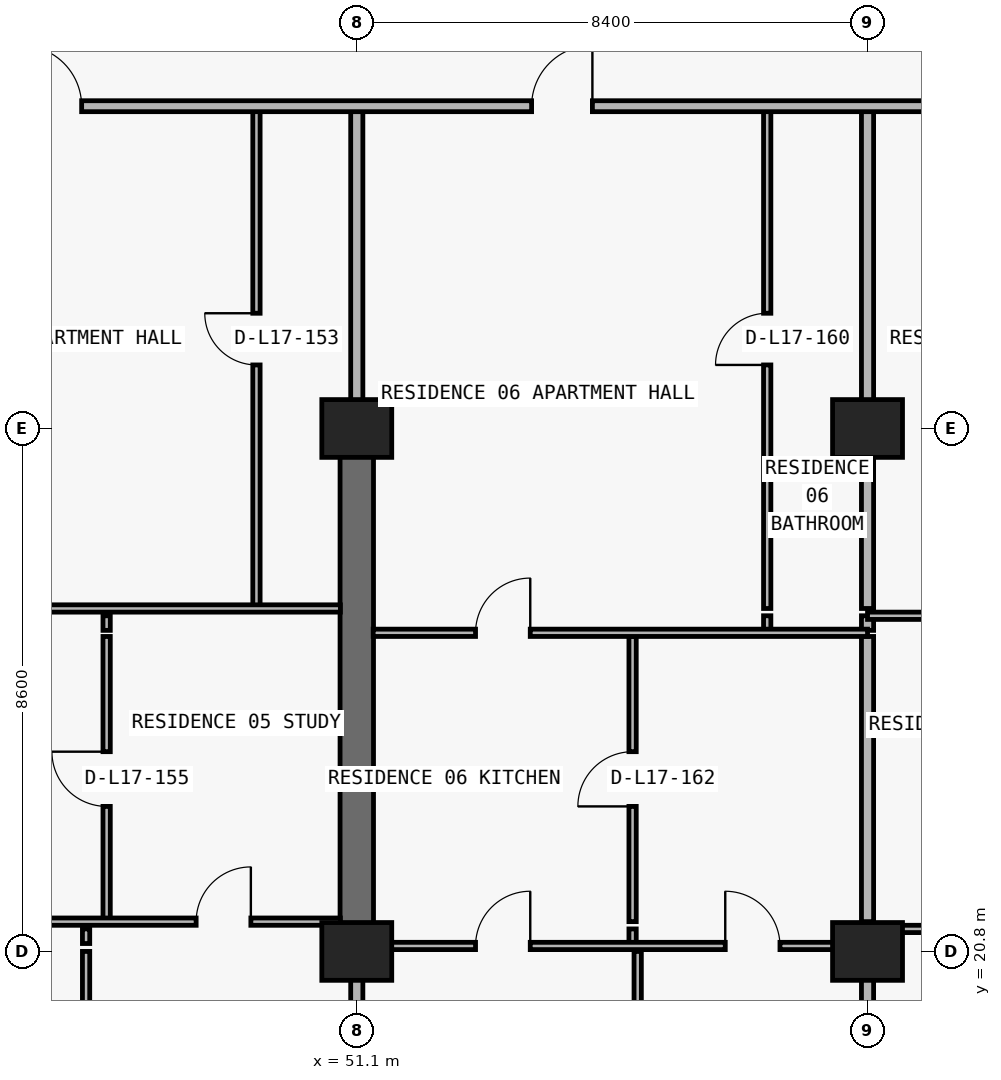
"""IFC4 building model, lengths in metres.
Left out: names, types, materials, properties, quantities, classifications, styles, units other than length and angle.
Written with IfcOpenShell. Run it as: python <this file> out.ifc"""

import sys

from ifc_helpers import new_model, si_unit, direction, frame, frame_2d, origin, origin_2d, place, context, subcontext, project, spatial, rectangle, extrude, element, fill, save


model = new_model("IFC4")
c1 = context("Model", 3, precision=1e-05, world=origin(), true_north=direction((0.0, 1.0)))
c2 = subcontext(c1, "Body", "Model", "MODEL_VIEW")
j1 = project(units=[si_unit("LENGTHUNIT", "METRE"), si_unit("PLANEANGLEUNIT", "RADIAN")], contexts=[c1])
p1 = place(None, origin())
s1 = spatial("IfcSite", under=j1, at=p1, CompositionType="ELEMENT")
p2 = place(p1, origin())
s2 = spatial("IfcBuilding", under=s1, at=p2, CompositionType="ELEMENT")
p3 = place(p2, frame((0.0, 0.0, 66.3)))
s3 = spatial("IfcBuildingStorey", under=s2, at=p3, CompositionType="ELEMENT", Elevation=66.3)
for number, where, z_axis, x_axis in (
    (1, (51.1, 20.8, 0.0), (0.0, 0.0, 1.0), (1.0, 0.0, 0.0)),
    (2, (59.5, 20.8, 0.0), (0.0, 0.0, 1.0), (1.0, 0.0, 0.0)),
    (3, (51.1, 29.4, 0.0), (0.0, 0.0, 1.0), (1.0, 0.0, 0.0)),
    (4, (59.5, 29.4, 0.0), (0.0, 0.0, 1.0), (1.0, 0.0, 0.0)),
):
    element("IfcColumn", number, at=place(p3, frame(where, z_axis=z_axis, x_axis=x_axis)), inside=s3, PredefinedType="COLUMN", context=c2, shape_type="SweptSolid", body=[
        extrude(rectangle(XDim=1.15, YDim=0.95, at=origin_2d()), origin(), (0.0, 0.0, 1.0), 3.05),
    ])
p4 = place(p3, frame((51.1, 20.8, 0.0), z_axis=(0.0, 0.0, 1.0), x_axis=(0.0, 1.0, 0.0)))
e5 = element("IfcWall", 5, at=p4, inside=s3, PredefinedType="SHEAR", context=c2, shape_type="SweptSolid", body=[
    extrude(rectangle(XDim=8.6, YDim=0.55, at=frame_2d((4.3, 0.0))), origin(), (0.0, 0.0, 1.0), 3.05),
])
p5 = place(p3, frame((46.648, 6.24, 0.0), z_axis=(0.0, 0.0, 1.0), x_axis=(0.0, 1.0, 0.0)))
e6 = element("IfcWall", 6, at=p5, inside=s3, PredefinedType="PARTITIONING", context=c2, shape_type="SweptSolid", body=[
    extrude(rectangle(XDim=14.56, YDim=0.12, at=frame_2d((7.28, 0.0))), origin(), (0.0, 0.0, 1.0), 2.423),
])
p6 = place(p3, frame((46.648, 20.93, 0.0), z_axis=(0.0, 0.0, 1.0), x_axis=(0.0, 1.0, 0.0)))
e7 = element("IfcWall", 7, at=p6, inside=s3, PredefinedType="PARTITIONING", context=c2, shape_type="SweptSolid", body=[
    extrude(rectangle(XDim=0.24, YDim=0.12, at=frame_2d((0.12, 0.0))), origin(), (0.0, 0.0, 1.0), 2.423),
])
p7 = place(p3, frame((46.986, 21.29, 0.0), z_axis=(0.0, 0.0, 1.0), x_axis=(0.0, 1.0, 0.0)))
e8 = element("IfcWall", 8, at=p7, inside=s3, PredefinedType="PARTITIONING", context=c2, shape_type="SweptSolid", body=[
    extrude(rectangle(XDim=4.69, YDim=0.12, at=frame_2d((2.345, 0.0))), origin(), (0.0, 0.0, 1.0), 2.423),
])
p8 = place(p7, frame((1.895, 0.0, 0.0)))
e9 = element("IfcOpeningElement", 9, at=p8, cuts=e8, PredefinedType="OPENING", context=c2, shape_type="SweptSolid", body=[
    extrude(rectangle(XDim=0.9, YDim=2.15, at=frame_2d((0.45, 1.075))), frame((0.0, 0.07, 0.0), z_axis=(0.0, -1.0, 0.0), x_axis=(1.0, 0.0, 0.0)), (0.0, 0.0, 1.0), 0.14),
])
p9 = place(p3, frame((46.986, 26.08, 0.0), z_axis=(0.0, 0.0, 1.0), x_axis=(0.0, 1.0, 0.0)))
e10 = element("IfcWall", 10, at=p9, inside=s3, PredefinedType="PARTITIONING", context=c2, shape_type="SweptSolid", body=[
    extrude(rectangle(XDim=0.24, YDim=0.12, at=frame_2d((0.12, 0.0))), origin(), (0.0, 0.0, 1.0), 2.423),
])
p10 = place(p3, frame((49.45, 26.44, 0.0), z_axis=(0.0, 0.0, 1.0), x_axis=(0.0, 1.0, 0.0)))
e11 = element("IfcWall", 11, at=p10, inside=s3, PredefinedType="PARTITIONING", context=c2, shape_type="SweptSolid", body=[
    extrude(rectangle(XDim=8.26, YDim=0.12, at=frame_2d((4.13, 0.0))), origin(), (0.0, 0.0, 1.0), 3.05),
])
p11 = place(p10, frame((4.005, 0.0, 0.0)))
e12 = element("IfcOpeningElement", 12, at=p11, cuts=e11, PredefinedType="OPENING", context=c2, shape_type="SweptSolid", body=[
    extrude(rectangle(XDim=0.85, YDim=2.1, at=frame_2d((0.425, 1.05))), frame((0.0, 0.07, 0.0), z_axis=(0.0, -1.0, 0.0), x_axis=(1.0, 0.0, 0.0)), (0.0, 0.0, 1.0), 0.14),
])
p12 = place(p3, frame((51.1, 6.24, 0.0), z_axis=(0.0, 0.0, 1.0), x_axis=(0.0, 1.0, 0.0)))
e13 = element("IfcWall", 13, at=p12, inside=s3, PredefinedType="PARTITIONING", context=c2, shape_type="SweptSolid", body=[
    extrude(rectangle(XDim=14.555, YDim=0.2, at=frame_2d((7.277, 0.0))), origin(), (0.0, 0.0, 1.0), 2.11),
])
p13 = place(p3, frame((51.1, 29.405, 0.0), z_axis=(0.0, 0.0, 1.0), x_axis=(0.0, 1.0, 0.0)))
e14 = element("IfcWall", 14, at=p13, inside=s3, PredefinedType="PARTITIONING", context=c2, shape_type="SweptSolid", body=[
    extrude(rectangle(XDim=5.295, YDim=0.2, at=frame_2d((2.647, 0.0))), origin(), (0.0, 0.0, 1.0), 2.335),
])
p14 = place(p3, frame((55.636, 20.93, 0.0), z_axis=(0.0, 0.0, 1.0), x_axis=(0.0, 1.0, 0.0)))
e15 = element("IfcWall", 15, at=p14, inside=s3, PredefinedType="PARTITIONING", context=c2, shape_type="SweptSolid", body=[
    extrude(rectangle(XDim=0.24, YDim=0.12, at=frame_2d((0.12, 0.0))), origin(), (0.0, 0.0, 1.0), 3.05),
])
p15 = place(p3, frame((55.636, 21.29, 0.0), z_axis=(0.0, 0.0, 1.0), x_axis=(0.0, 1.0, 0.0)))
e16 = element("IfcWall", 16, at=p15, inside=s3, PredefinedType="PARTITIONING", context=c2, shape_type="SweptSolid", body=[
    extrude(rectangle(XDim=4.69, YDim=0.12, at=frame_2d((2.345, 0.0))), origin(), (0.0, 0.0, 1.0), 3.05),
])
p16 = place(p15, frame((1.895, 0.0, 0.0)))
e17 = element("IfcOpeningElement", 17, at=p16, cuts=e16, PredefinedType="OPENING", context=c2, shape_type="SweptSolid", body=[
    extrude(rectangle(XDim=0.9, YDim=2.15, at=frame_2d((0.45, 1.075))), frame((0.0, 0.07, 0.0), z_axis=(0.0, -1.0, 0.0), x_axis=(1.0, 0.0, 0.0)), (0.0, 0.0, 1.0), 0.14),
])
p17 = place(p3, frame((55.72, 6.24, 0.0), z_axis=(0.0, 0.0, 1.0), x_axis=(0.0, 1.0, 0.0)))
e18 = element("IfcWall", 18, at=p17, inside=s3, PredefinedType="PARTITIONING", context=c2, shape_type="SweptSolid", body=[
    extrude(rectangle(XDim=14.56, YDim=0.12, at=frame_2d((7.28, 0.0))), origin(), (0.0, 0.0, 1.0), 3.05),
])
p18 = place(p3, frame((57.85, 26.08, 0.0), z_axis=(0.0, 0.0, 1.0), x_axis=(0.0, 1.0, 0.0)))
e19 = element("IfcWall", 19, at=p18, inside=s3, PredefinedType="PARTITIONING", context=c2, shape_type="SweptSolid", body=[
    extrude(rectangle(XDim=0.24, YDim=0.12, at=frame_2d((0.12, 0.0))), origin(), (0.0, 0.0, 1.0), 3.05),
])
p19 = place(p3, frame((57.85, 26.44, 0.0), z_axis=(0.0, 0.0, 1.0), x_axis=(0.0, 1.0, 0.0)))
e20 = element("IfcWall", 20, at=p19, inside=s3, PredefinedType="PARTITIONING", context=c2, shape_type="SweptSolid", body=[
    extrude(rectangle(XDim=8.26, YDim=0.12, at=frame_2d((4.13, 0.0))), origin(), (0.0, 0.0, 1.0), 3.05),
])
p20 = place(p19, frame((4.005, 0.0, 0.0)))
e21 = element("IfcOpeningElement", 21, at=p20, cuts=e20, PredefinedType="OPENING", context=c2, shape_type="SweptSolid", body=[
    extrude(rectangle(XDim=0.85, YDim=2.1, at=frame_2d((0.425, 1.05))), frame((0.0, 0.07, 0.0), z_axis=(0.0, -1.0, 0.0), x_axis=(1.0, 0.0, 0.0)), (0.0, 0.0, 1.0), 0.14),
])
p21 = place(p3, frame((59.5, 6.24, 0.0), z_axis=(0.0, 0.0, 1.0), x_axis=(0.0, 1.0, 0.0)))
e22 = element("IfcWall", 22, at=p21, inside=s3, PredefinedType="PARTITIONING", context=c2, shape_type="SweptSolid", body=[
    extrude(rectangle(XDim=14.56, YDim=0.2, at=frame_2d((7.28, 0.0))), origin(), (0.0, 0.0, 1.0), 2.11),
])
p22 = place(p3, frame((59.5, 20.93, 0.0), z_axis=(0.0, 0.0, 1.0), x_axis=(0.0, 1.0, 0.0)))
e23 = element("IfcWall", 23, at=p22, inside=s3, PredefinedType="PARTITIONING", context=c2, shape_type="SweptSolid", body=[
    extrude(rectangle(XDim=0.24, YDim=0.2, at=frame_2d((0.12, 0.0))), origin(), (0.0, 0.0, 1.0), 3.05),
])
p23 = place(p3, frame((59.5, 21.29, 0.0), z_axis=(0.0, 0.0, 1.0), x_axis=(0.0, 1.0, 0.0)))
e24 = element("IfcWall", 24, at=p23, inside=s3, PredefinedType="PARTITIONING", context=c2, shape_type="SweptSolid", body=[
    extrude(rectangle(XDim=4.69, YDim=0.2, at=frame_2d((2.345, 0.0))), origin(), (0.0, 0.0, 1.0), 2.11),
])
p24 = place(p3, frame((59.5, 26.08, 0.0), z_axis=(0.0, 0.0, 1.0), x_axis=(0.0, 1.0, 0.0)))
e25 = element("IfcWall", 25, at=p24, inside=s3, PredefinedType="PARTITIONING", context=c2, shape_type="SweptSolid", body=[
    extrude(rectangle(XDim=0.24, YDim=0.2, at=frame_2d((0.12, 0.0))), origin(), (0.0, 0.0, 1.0), 2.11),
])
p25 = place(p3, frame((59.5, 26.44, 0.0), z_axis=(0.0, 0.0, 1.0), x_axis=(0.0, 1.0, 0.0)))
e26 = element("IfcWall", 26, at=p25, inside=s3, PredefinedType="PARTITIONING", context=c2, shape_type="SweptSolid", body=[
    extrude(rectangle(XDim=8.26, YDim=0.2, at=frame_2d((4.13, 0.0))), origin(), (0.0, 0.0, 1.0), 2.11),
])
p26 = place(p3, frame((51.37, 20.89, 0.0), z_axis=(0.0, 0.0, 1.0), x_axis=(1.0, 0.0, 0.0)))
e27 = element("IfcWall", 27, at=p26, inside=s3, PredefinedType="PARTITIONING", context=c2, shape_type="SweptSolid", body=[
    extrude(rectangle(XDim=8.13, YDim=0.12, at=frame_2d((4.065, 0.0))), origin(), (0.0, 0.0, 1.0), 2.11),
])
p27 = place(p26, frame((1.683, 0.0, 0.0)))
e28 = element("IfcOpeningElement", 28, at=p27, cuts=e27, PredefinedType="OPENING", context=c2, shape_type="SweptSolid", body=[
    extrude(rectangle(XDim=0.9, YDim=2.06, at=frame_2d((0.45, 1.03))), frame((0.0, 0.07, 0.0), z_axis=(0.0, -1.0, 0.0), x_axis=(1.0, 0.0, 0.0)), (0.0, 0.0, 1.0), 0.14),
])
p28 = place(p26, frame((5.79, 0.0, 0.0)))
e29 = element("IfcOpeningElement", 29, at=p28, cuts=e27, PredefinedType="OPENING", context=c2, shape_type="SweptSolid", body=[
    extrude(rectangle(XDim=0.9, YDim=2.06, at=frame_2d((0.45, 1.03))), frame((0.0, 0.07, 0.0), z_axis=(0.0, -1.0, 0.0), x_axis=(1.0, 0.0, 0.0)), (0.0, 0.0, 1.0), 0.14),
])
p29 = place(p3, frame((59.5, 21.17, 0.0), z_axis=(0.0, 0.0, 1.0), x_axis=(1.0, 0.0, 0.0)))
e30 = element("IfcWall", 30, at=p29, inside=s3, PredefinedType="PARTITIONING", context=c2, shape_type="SweptSolid", body=[
    extrude(rectangle(XDim=8.4, YDim=0.12, at=frame_2d((4.2, 0.0))), origin(), (0.0, 0.0, 1.0), 3.05),
])
p30 = place(p29, frame((1.524, 0.0, 0.0)))
e31 = element("IfcOpeningElement", 31, at=p30, cuts=e30, PredefinedType="OPENING", context=c2, shape_type="SweptSolid", body=[
    extrude(rectangle(XDim=0.9, YDim=2.15, at=frame_2d((0.45, 1.075))), frame((0.0, 0.07, 0.0), z_axis=(0.0, -1.0, 0.0), x_axis=(1.0, 0.0, 0.0)), (0.0, 0.0, 1.0), 0.14),
])
p31 = place(p29, frame((6.143, 0.0, 0.0)))
e32 = element("IfcOpeningElement", 32, at=p31, cuts=e30, PredefinedType="OPENING", context=c2, shape_type="SweptSolid", body=[
    extrude(rectangle(XDim=0.9, YDim=2.15, at=frame_2d((0.45, 1.075))), frame((0.0, 0.07, 0.0), z_axis=(0.0, -1.0, 0.0), x_axis=(1.0, 0.0, 0.0)), (0.0, 0.0, 1.0), 0.14),
])
p32 = place(p3, frame((42.7, 21.29, 0.0), z_axis=(0.0, 0.0, 1.0), x_axis=(1.0, 0.0, 0.0)))
e33 = element("IfcWall", 33, at=p32, inside=s3, PredefinedType="PARTITIONING", context=c2, shape_type="SweptSolid", body=[
    extrude(rectangle(XDim=8.13, YDim=0.12, at=frame_2d((4.065, 0.0))), origin(), (0.0, 0.0, 1.0), 3.05),
])
p33 = place(p32, frame((1.524, 0.0, 0.0)))
e34 = element("IfcOpeningElement", 34, at=p33, cuts=e33, PredefinedType="OPENING", context=c2, shape_type="SweptSolid", body=[
    extrude(rectangle(XDim=0.9, YDim=2.15, at=frame_2d((0.45, 1.075))), frame((0.0, 0.07, 0.0), z_axis=(0.0, -1.0, 0.0), x_axis=(1.0, 0.0, 0.0)), (0.0, 0.0, 1.0), 0.14),
])
p34 = place(p32, frame((5.758, 0.0, 0.0)))
e35 = element("IfcOpeningElement", 35, at=p34, cuts=e33, PredefinedType="OPENING", context=c2, shape_type="SweptSolid", body=[
    extrude(rectangle(XDim=0.9, YDim=2.15, at=frame_2d((0.45, 1.075))), frame((0.0, 0.07, 0.0), z_axis=(0.0, -1.0, 0.0), x_axis=(1.0, 0.0, 0.0)), (0.0, 0.0, 1.0), 0.14),
])
p35 = place(p3, frame((51.37, 26.04, 0.0), z_axis=(0.0, 0.0, 1.0), x_axis=(1.0, 0.0, 0.0)))
e36 = element("IfcWall", 36, at=p35, inside=s3, PredefinedType="PARTITIONING", context=c2, shape_type="SweptSolid", body=[
    extrude(rectangle(XDim=8.13, YDim=0.12, at=frame_2d((4.065, 0.0))), origin(), (0.0, 0.0, 1.0), 3.05),
])
p36 = place(p35, frame((1.683, 0.0, 0.0)))
e37 = element("IfcOpeningElement", 37, at=p36, cuts=e36, PredefinedType="OPENING", context=c2, shape_type="SweptSolid", body=[
    extrude(rectangle(XDim=0.9, YDim=2.15, at=frame_2d((0.45, 1.075))), frame((0.0, 0.07, 0.0), z_axis=(0.0, -1.0, 0.0), x_axis=(1.0, 0.0, 0.0)), (0.0, 0.0, 1.0), 0.14),
])
p37 = place(p3, frame((59.5, 26.32, 0.0), z_axis=(0.0, 0.0, 1.0), x_axis=(1.0, 0.0, 0.0)))
e38 = element("IfcWall", 38, at=p37, inside=s3, PredefinedType="PARTITIONING", context=c2, shape_type="SweptSolid", body=[
    extrude(rectangle(XDim=8.4, YDim=0.12, at=frame_2d((4.2, 0.0))), origin(), (0.0, 0.0, 1.0), 3.05),
])
p38 = place(p37, frame((1.943, 0.0, 0.0)))
e39 = element("IfcOpeningElement", 39, at=p38, cuts=e38, PredefinedType="OPENING", context=c2, shape_type="SweptSolid", body=[
    extrude(rectangle(XDim=0.9, YDim=2.15, at=frame_2d((0.45, 1.075))), frame((0.0, 0.07, 0.0), z_axis=(0.0, -1.0, 0.0), x_axis=(1.0, 0.0, 0.0)), (0.0, 0.0, 1.0), 0.14),
])
p39 = place(p3, frame((42.7, 26.44, 0.0), z_axis=(0.0, 0.0, 1.0), x_axis=(1.0, 0.0, 0.0)))
e40 = element("IfcWall", 40, at=p39, inside=s3, PredefinedType="PARTITIONING", context=c2, shape_type="SweptSolid", body=[
    extrude(rectangle(XDim=8.13, YDim=0.12, at=frame_2d((4.065, 0.0))), origin(), (0.0, 0.0, 1.0), 3.05),
])
p40 = place(p39, frame((1.693, 0.0, 0.0)))
e41 = element("IfcOpeningElement", 41, at=p40, cuts=e40, PredefinedType="OPENING", context=c2, shape_type="SweptSolid", body=[
    extrude(rectangle(XDim=0.9, YDim=2.15, at=frame_2d((0.45, 1.075))), frame((0.0, 0.07, 0.0), z_axis=(0.0, -1.0, 0.0), x_axis=(1.0, 0.0, 0.0)), (0.0, 0.0, 1.0), 0.14),
])
p41 = place(p3, frame((26.7, 34.7, 0.0), z_axis=(0.0, 0.0, 1.0), x_axis=(1.0, 0.0, 0.0)))
e42 = element("IfcWall", 42, at=p41, inside=s3, PredefinedType="PARTITIONING", context=c2, shape_type="SweptSolid", body=[
    extrude(rectangle(XDim=46.0, YDim=0.18, at=frame_2d((23.0, 0.0))), origin(), (0.0, 0.0, 1.0), 3.05),
])
p42 = place(p41, frame((2.875, 0.0, 0.0)))
e43 = element("IfcOpeningElement", 43, at=p42, cuts=e42, PredefinedType="OPENING", context=c2, shape_type="SweptSolid", body=[
    extrude(rectangle(XDim=1.0, YDim=2.2, at=frame_2d((0.5, 1.1))), frame((0.0, 0.1, 0.0), z_axis=(0.0, -1.0, 0.0), x_axis=(1.0, 0.0, 0.0)), (0.0, 0.0, 1.0), 0.2),
])
p43 = place(p41, frame((10.875, 0.0, 0.0)))
e44 = element("IfcOpeningElement", 44, at=p43, cuts=e42, PredefinedType="OPENING", context=c2, shape_type="SweptSolid", body=[
    extrude(rectangle(XDim=1.0, YDim=2.2, at=frame_2d((0.5, 1.1))), frame((0.0, 0.1, 0.0), z_axis=(0.0, -1.0, 0.0), x_axis=(1.0, 0.0, 0.0)), (0.0, 0.0, 1.0), 0.2),
])
p44 = place(p41, frame((18.875, 0.0, 0.0)))
e45 = element("IfcOpeningElement", 45, at=p44, cuts=e42, PredefinedType="OPENING", context=c2, shape_type="SweptSolid", body=[
    extrude(rectangle(XDim=1.0, YDim=2.2, at=frame_2d((0.5, 1.1))), frame((0.0, 0.1, 0.0), z_axis=(0.0, -1.0, 0.0), x_axis=(1.0, 0.0, 0.0)), (0.0, 0.0, 1.0), 0.2),
])
p45 = place(p41, frame((27.275, 0.0, 0.0)))
e46 = element("IfcOpeningElement", 46, at=p45, cuts=e42, PredefinedType="OPENING", context=c2, shape_type="SweptSolid", body=[
    extrude(rectangle(XDim=1.0, YDim=2.2, at=frame_2d((0.5, 1.1))), frame((0.0, 0.1, 0.0), z_axis=(0.0, -1.0, 0.0), x_axis=(1.0, 0.0, 0.0)), (0.0, 0.0, 1.0), 0.2),
])
p46 = place(p41, frame((35.675, 0.0, 0.0)))
e47 = element("IfcOpeningElement", 47, at=p46, cuts=e42, PredefinedType="OPENING", context=c2, shape_type="SweptSolid", body=[
    extrude(rectangle(XDim=1.0, YDim=2.2, at=frame_2d((0.5, 1.1))), frame((0.0, 0.1, 0.0), z_axis=(0.0, -1.0, 0.0), x_axis=(1.0, 0.0, 0.0)), (0.0, 0.0, 1.0), 0.2),
])
p47 = place(p44, origin())
e48 = element("IfcDoor", 48, at=p47, inside=s3, OperationType="SINGLE_SWING_LEFT", PredefinedType="DOOR", context=c2, shape_type="SweptSolid", body=[
    extrude(rectangle(XDim=1.0, YDim=2.2, at=frame_2d((0.5, 1.1))), frame((0.0, 0.025, 0.0), z_axis=(0.0, -1.0, 0.0), x_axis=(1.0, 0.0, 0.0)), (0.0, 0.0, 1.0), 0.05),
])
fill(e45, e48)
p48 = place(p11, origin())
e49 = element("IfcDoor", 49, at=p48, inside=s3, OperationType="SINGLE_SWING_RIGHT", PredefinedType="DOOR", context=c2, shape_type="SweptSolid", body=[
    extrude(rectangle(XDim=0.85, YDim=2.1, at=frame_2d((0.425, 1.05))), frame((0.0, 0.025, 0.0), z_axis=(0.0, -1.0, 0.0), x_axis=(1.0, 0.0, 0.0)), (0.0, 0.0, 1.0), 0.05),
])
fill(e12, e49)
p49 = place(p8, origin())
e50 = element("IfcDoor", 50, at=p49, inside=s3, OperationType="SINGLE_SWING_RIGHT", PredefinedType="DOOR", context=c2, shape_type="SweptSolid", body=[
    extrude(rectangle(XDim=0.9, YDim=2.15, at=frame_2d((0.45, 1.075))), frame((0.0, 0.025, 0.0), z_axis=(0.0, -1.0, 0.0), x_axis=(1.0, 0.0, 0.0)), (0.0, 0.0, 1.0), 0.05),
])
fill(e9, e50)
p50 = place(p34, origin())
e51 = element("IfcDoor", 51, at=p50, inside=s3, OperationType="SINGLE_SWING_RIGHT", PredefinedType="DOOR", context=c2, shape_type="SweptSolid", body=[
    extrude(rectangle(XDim=0.9, YDim=2.15, at=frame_2d((0.45, 1.075))), frame((0.0, 0.025, 0.0), z_axis=(0.0, -1.0, 0.0), x_axis=(1.0, 0.0, 0.0)), (0.0, 0.0, 1.0), 0.05),
])
fill(e35, e51)
p51 = place(p45, origin())
e52 = element("IfcDoor", 52, at=p51, inside=s3, OperationType="SINGLE_SWING_RIGHT", PredefinedType="DOOR", context=c2, shape_type="SweptSolid", body=[
    extrude(rectangle(XDim=1.0, YDim=2.2, at=frame_2d((0.5, 1.1))), frame((0.0, 0.025, 0.0), z_axis=(0.0, -1.0, 0.0), x_axis=(1.0, 0.0, 0.0)), (0.0, 0.0, 1.0), 0.05),
])
fill(e46, e52)
p52 = place(p20, origin())
e53 = element("IfcDoor", 53, at=p52, inside=s3, OperationType="SINGLE_SWING_LEFT", PredefinedType="DOOR", context=c2, shape_type="SweptSolid", body=[
    extrude(rectangle(XDim=0.85, YDim=2.1, at=frame_2d((0.425, 1.05))), frame((0.0, 0.025, 0.0), z_axis=(0.0, -1.0, 0.0), x_axis=(1.0, 0.0, 0.0)), (0.0, 0.0, 1.0), 0.05),
])
fill(e21, e53)
p53 = place(p36, origin())
e54 = element("IfcDoor", 54, at=p53, inside=s3, OperationType="SINGLE_SWING_RIGHT", PredefinedType="DOOR", context=c2, shape_type="SweptSolid", body=[
    extrude(rectangle(XDim=0.9, YDim=2.15, at=frame_2d((0.45, 1.075))), frame((0.0, 0.025, 0.0), z_axis=(0.0, -1.0, 0.0), x_axis=(1.0, 0.0, 0.0)), (0.0, 0.0, 1.0), 0.05),
])
fill(e37, e54)
p54 = place(p16, origin())
e55 = element("IfcDoor", 55, at=p54, inside=s3, OperationType="SINGLE_SWING_LEFT", PredefinedType="DOOR", context=c2, shape_type="SweptSolid", body=[
    extrude(rectangle(XDim=0.9, YDim=2.15, at=frame_2d((0.45, 1.075))), frame((0.0, 0.025, 0.0), z_axis=(0.0, -1.0, 0.0), x_axis=(1.0, 0.0, 0.0)), (0.0, 0.0, 1.0), 0.05),
])
fill(e17, e55)
p55 = place(p27, origin())
e56 = element("IfcDoor", 56, at=p55, inside=s3, OperationType="SINGLE_SWING_RIGHT", PredefinedType="DOOR", context=c2, shape_type="SweptSolid", body=[
    extrude(rectangle(XDim=0.9, YDim=2.06, at=frame_2d((0.45, 1.03))), frame((0.0, 0.025, 0.0), z_axis=(0.0, -1.0, 0.0), x_axis=(1.0, 0.0, 0.0)), (0.0, 0.0, 1.0), 0.05),
])
fill(e28, e56)
p56 = place(p28, origin())
e57 = element("IfcDoor", 57, at=p56, inside=s3, OperationType="SINGLE_SWING_LEFT", PredefinedType="DOOR", context=c2, shape_type="SweptSolid", body=[
    extrude(rectangle(XDim=0.9, YDim=2.06, at=frame_2d((0.45, 1.03))), frame((0.0, 0.025, 0.0), z_axis=(0.0, -1.0, 0.0), x_axis=(1.0, 0.0, 0.0)), (0.0, 0.0, 1.0), 0.05),
])
fill(e29, e57)
save(model, sys.argv[1])
